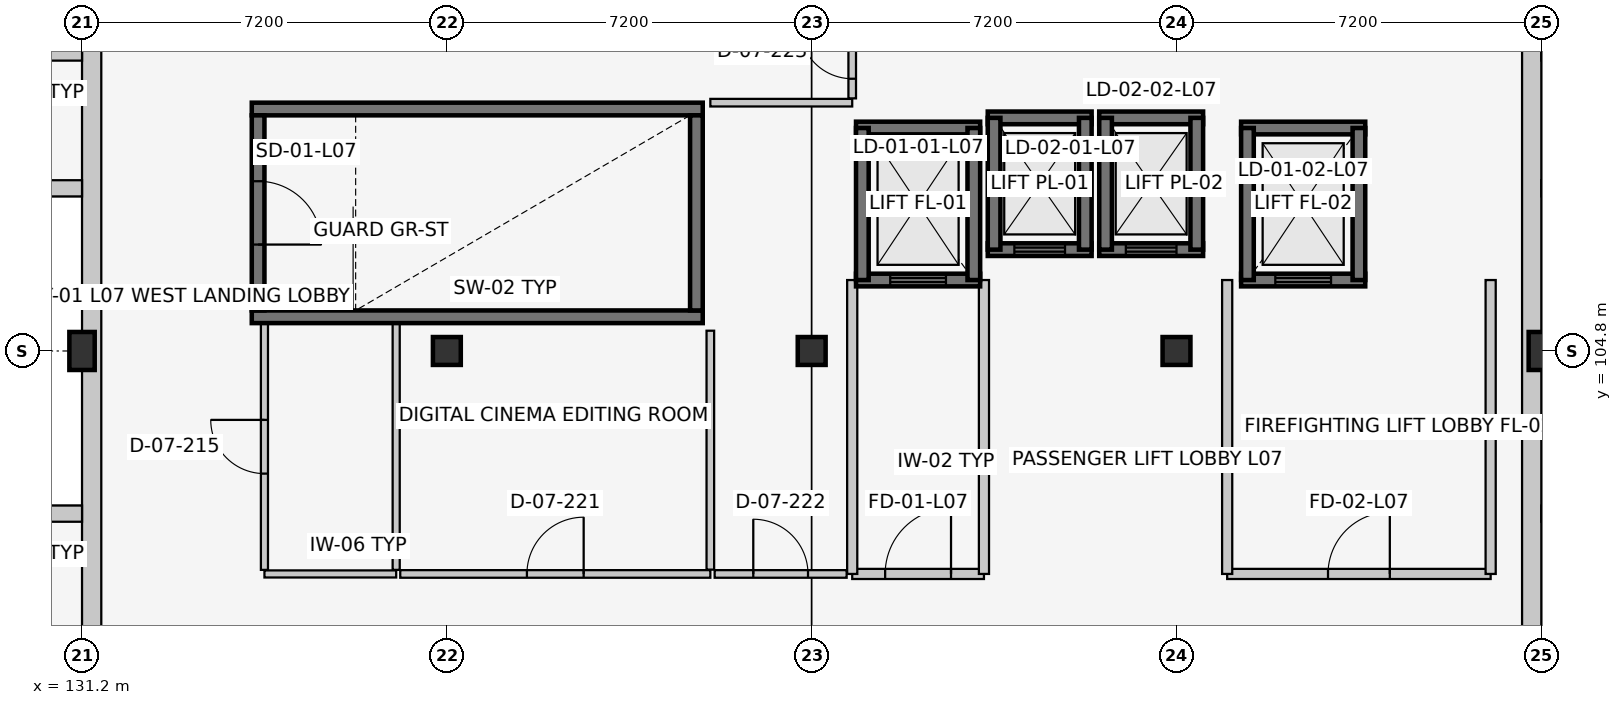
"""IFC4 building model, lengths in metres.
Left out: names, types, materials, properties, quantities, classifications, styles, units other than length and angle.
Written with IfcOpenShell. Run it as: python <this file> out.ifc"""

import sys

from ifc_helpers import new_model, si_unit, direction, frame, frame_2d, origin, origin_2d, place, context, subcontext, project, spatial, rectangle, extrude, element, fill, save


model = new_model("IFC4")
c1 = context("Model", 3, precision=1e-05, world=origin(), true_north=direction((0.0, 1.0)))
c2 = subcontext(c1, "Body", "Model", "MODEL_VIEW")
j1 = project(units=[si_unit("LENGTHUNIT", "METRE"), si_unit("PLANEANGLEUNIT", "RADIAN")], contexts=[c1])
p1 = place(None, origin())
s1 = spatial("IfcSite", under=j1, at=p1, CompositionType="ELEMENT")
p2 = place(p1, origin())
s2 = spatial("IfcBuilding", under=s1, at=p2, CompositionType="ELEMENT")
p3 = place(p2, frame((0.0, 0.0, 29.7)))
s3 = spatial("IfcBuildingStorey", under=s2, at=p3, CompositionType="ELEMENT", Elevation=29.7)
p4 = place(p3, frame((131.2, 104.8, 0.0), z_axis=(0.0, 0.0, 1.0), x_axis=(1.0, 0.0, 0.0)))
e1 = element("IfcColumn", 1, at=p4, inside=s3, PredefinedType="COLUMN", context=c2, shape_type="SweptSolid", body=[
    extrude(rectangle(XDim=0.5, YDim=0.75, at=origin_2d()), origin(), (0.0, 0.0, 1.0), 4.2),
])
for number, where, z_axis, x_axis in (
    (2, (138.4, 104.8, 0.0), (0.0, 0.0, 1.0), (1.0, 0.0, 0.0)),
    (3, (145.6, 104.8, 0.0), (0.0, 0.0, 1.0), (1.0, 0.0, 0.0)),
    (4, (152.8, 104.8, 0.0), (0.0, 0.0, 1.0), (1.0, 0.0, 0.0)),
):
    element("IfcColumn", number, at=place(p3, frame(where, z_axis=z_axis, x_axis=x_axis)), inside=s3, PredefinedType="COLUMN", context=c2, shape_type="SweptSolid", body=[
        extrude(rectangle(XDim=0.55, YDim=0.55, at=origin_2d()), origin(), (0.0, 0.0, 1.0), 4.2),
    ])
p5 = place(p3, frame((160.0, 104.8, 0.0), z_axis=(0.0, 0.0, 1.0), x_axis=(1.0, 0.0, 0.0)))
e5 = element("IfcColumn", 5, at=p5, inside=s3, PredefinedType="COLUMN", context=c2, shape_type="SweptSolid", body=[
    extrude(rectangle(XDim=0.5, YDim=0.75, at=origin_2d()), origin(), (0.0, 0.0, 1.0), 4.2),
])
p6 = place(p3, frame((159.81, 112.0, 0.0), z_axis=(0.0, 0.0, 1.0), x_axis=(0.0, -1.0, 0.0)))
e6 = element("IfcWall", 6, at=p6, inside=s3, PredefinedType="SOLIDWALL", context=c2, shape_type="SweptSolid", body=[
    extrude(rectangle(XDim=28.8, YDim=0.38, at=frame_2d((14.4, 0.0))), origin(), (0.0, 0.0, 1.0), 3.455),
])
p7 = place(p3, frame((131.39, 83.2, 0.0), z_axis=(0.0, 0.0, 1.0), x_axis=(0.0, 1.0, 0.0)))
e7 = element("IfcWall", 7, at=p7, inside=s3, PredefinedType="SOLIDWALL", context=c2, shape_type="SweptSolid", body=[
    extrude(rectangle(XDim=28.8, YDim=0.38, at=frame_2d((14.4, 0.0))), origin(), (0.0, 0.0, 1.0), 3.455),
])
p8 = place(p7, frame((10.2, 0.0, 0.0)))
e8 = element("IfcOpeningElement", 8, at=p8, cuts=e7, PredefinedType="OPENING", context=c2, shape_type="SweptSolid", body=[
    extrude(rectangle(XDim=1.2, YDim=2.15, at=frame_2d((0.6, 1.075))), frame((0.0, 0.202, 0.0), z_axis=(0.0, -1.0, 0.0), x_axis=(1.0, 0.0, 0.0)), (0.0, 0.0, 1.0), 0.404),
])
for number, where, z_axis, x_axis in (
    (9, (131.2, 101.59, 0.0), (0.0, 0.0, 1.0), (-1.0, 0.0, 0.0)),
    (10, (131.2, 108.01, 0.0), (0.0, 0.0, 1.0), (-1.0, 0.0, 0.0)),
):
    element("IfcWall", number, at=place(p3, frame(where, z_axis=z_axis, x_axis=x_axis)), inside=s3, PredefinedType="SOLIDWALL", context=c2, shape_type="SweptSolid", body=[
        extrude(rectangle(XDim=1.35, YDim=0.32, at=frame_2d((0.675, 0.0))), origin(), (0.0, 0.0, 1.0), 4.18),
    ])
p9 = place(p3, frame((131.2, 110.69, 0.0), z_axis=(0.0, 0.0, 1.0), x_axis=(-1.0, 0.0, 0.0)))
e11 = element("IfcWall", 11, at=p9, inside=s3, PredefinedType="SOLIDWALL", context=c2, shape_type="SweptSolid", body=[
    extrude(rectangle(XDim=1.793, YDim=0.32, at=frame_2d((0.896, 0.0))), origin(), (0.0, 0.0, 1.0), 4.18),
])
for number, where, z_axis, x_axis in (
    (12, (134.55, 105.475, 0.0), (0.0, 0.0, 1.0), (1.0, 0.0, 0.0)),
    (13, (143.45, 109.575, 0.0), (0.0, 0.0, 1.0), (-1.0, 0.0, 0.0)),
):
    element("IfcWall", number, at=place(p3, frame(where, z_axis=z_axis, x_axis=x_axis)), inside=s3, PredefinedType="SHEAR", context=c2, shape_type="SweptSolid", body=[
        extrude(rectangle(XDim=8.9, YDim=0.25, at=frame_2d((4.45, 0.0))), origin(), (0.0, 0.0, 1.0), 4.2),
    ])
p10 = place(p3, frame((134.675, 109.45, 0.0), z_axis=(0.0, 0.0, 1.0), x_axis=(0.0, -1.0, 0.0)))
e14 = element("IfcWall", 14, at=p10, inside=s3, PredefinedType="SHEAR", context=c2, shape_type="SweptSolid", body=[
    extrude(rectangle(XDim=3.85, YDim=0.25, at=frame_2d((1.925, 0.0))), origin(), (0.0, 0.0, 1.0), 4.2),
])
p11 = place(p10, frame((1.3, 0.0, 0.0)))
e15 = element("IfcOpeningElement", 15, at=p11, cuts=e14, PredefinedType="OPENING", context=c2, shape_type="SweptSolid", body=[
    extrude(rectangle(XDim=1.25, YDim=2.15, at=frame_2d((0.625, 1.075))), frame((0.0, 0.137, 0.0), z_axis=(0.0, -1.0, 0.0), x_axis=(1.0, 0.0, 0.0)), (0.0, 0.0, 1.0), 0.274),
])
p12 = place(p3, frame((143.325, 105.6, 0.0), z_axis=(0.0, 0.0, 1.0), x_axis=(0.0, 1.0, 0.0)))
e16 = element("IfcWall", 16, at=p12, inside=s3, PredefinedType="SHEAR", context=c2, shape_type="SweptSolid", body=[
    extrude(rectangle(XDim=3.85, YDim=0.25, at=frame_2d((1.925, 0.0))), origin(), (0.0, 0.0, 1.0), 4.2),
])
p13 = place(p3, frame((146.475, 106.2, 0.0), z_axis=(0.0, 0.0, 1.0), x_axis=(1.0, 0.0, 0.0)))
e17 = element("IfcWall", 17, at=p13, inside=s3, PredefinedType="SHEAR", context=c2, shape_type="SweptSolid", body=[
    extrude(rectangle(XDim=2.45, YDim=0.25, at=frame_2d((1.225, 0.0))), origin(), (0.0, 0.0, 1.0), 4.2),
])
p14 = place(p13, frame((0.675, 0.0, 0.0)))
e18 = element("IfcOpeningElement", 18, at=p14, cuts=e17, PredefinedType="OPENING", context=c2, shape_type="SweptSolid", body=[
    extrude(rectangle(XDim=1.1, YDim=2.15, at=frame_2d((0.55, 1.075))), frame((0.0, 0.137, 0.0), z_axis=(0.0, -1.0, 0.0), x_axis=(1.0, 0.0, 0.0)), (0.0, 0.0, 1.0), 0.274),
])
p15 = place(p3, frame((148.925, 109.2, 0.0), z_axis=(0.0, 0.0, 1.0), x_axis=(-1.0, 0.0, 0.0)))
e19 = element("IfcWall", 19, at=p15, inside=s3, PredefinedType="SHEAR", context=c2, shape_type="SweptSolid", body=[
    extrude(rectangle(XDim=2.45, YDim=0.25, at=frame_2d((1.225, 0.0))), origin(), (0.0, 0.0, 1.0), 4.2),
])
for number, where, z_axis, x_axis in (
    (20, (146.6, 109.2, 0.0), (0.0, 0.0, 1.0), (0.0, -1.0, 0.0)),
    (21, (148.8, 106.2, 0.0), (0.0, 0.0, 1.0), (0.0, 1.0, 0.0)),
):
    element("IfcWall", number, at=place(p3, frame(where, z_axis=z_axis, x_axis=x_axis)), inside=s3, PredefinedType="SHEAR", context=c2, shape_type="SweptSolid", body=[
        extrude(rectangle(XDim=3.0, YDim=0.25, at=frame_2d((1.5, 0.0))), origin(), (0.0, 0.0, 1.0), 4.2),
    ])
p16 = place(p3, frame((146.4, 100.4, 0.0), z_axis=(0.0, 0.0, 1.0), x_axis=(1.0, 0.0, 0.0)))
e22 = element("IfcWall", 22, at=p16, inside=s3, PredefinedType="PARTITIONING", context=c2, shape_type="SweptSolid", body=[
    extrude(rectangle(XDim=2.6, YDim=0.2, at=frame_2d((1.3, 0.0))), origin(), (0.0, 0.0, 1.0), 4.2),
])
p17 = place(p16, frame((0.65, 0.0, 0.0)))
e23 = element("IfcOpeningElement", 23, at=p17, cuts=e22, PredefinedType="OPENING", context=c2, shape_type="SweptSolid", body=[
    extrude(rectangle(XDim=1.3, YDim=2.2, at=frame_2d((0.65, 1.1))), frame((0.0, 0.112, 0.0), z_axis=(0.0, -1.0, 0.0), x_axis=(1.0, 0.0, 0.0)), (0.0, 0.0, 1.0), 0.224),
])
for number, where, z_axis, x_axis in (
    (24, (146.4, 106.2, 0.0), (0.0, 0.0, 1.0), (0.0, -1.0, 0.0)),
    (25, (149.0, 100.4, 0.0), (0.0, 0.0, 1.0), (0.0, 1.0, 0.0)),
):
    element("IfcWall", number, at=place(p3, frame(where, z_axis=z_axis, x_axis=x_axis)), inside=s3, PredefinedType="PARTITIONING", context=c2, shape_type="SweptSolid", body=[
        extrude(rectangle(XDim=5.8, YDim=0.2, at=frame_2d((2.9, 0.0))), origin(), (0.0, 0.0, 1.0), 4.2),
    ])
p18 = place(p3, frame((154.075, 106.2, 0.0), z_axis=(0.0, 0.0, 1.0), x_axis=(1.0, 0.0, 0.0)))
e26 = element("IfcWall", 26, at=p18, inside=s3, PredefinedType="SHEAR", context=c2, shape_type="SweptSolid", body=[
    extrude(rectangle(XDim=2.45, YDim=0.25, at=frame_2d((1.225, 0.0))), origin(), (0.0, 0.0, 1.0), 4.2),
])
p19 = place(p18, frame((0.675, 0.0, 0.0)))
e27 = element("IfcOpeningElement", 27, at=p19, cuts=e26, PredefinedType="OPENING", context=c2, shape_type="SweptSolid", body=[
    extrude(rectangle(XDim=1.1, YDim=2.15, at=frame_2d((0.55, 1.075))), frame((0.0, 0.137, 0.0), z_axis=(0.0, -1.0, 0.0), x_axis=(1.0, 0.0, 0.0)), (0.0, 0.0, 1.0), 0.274),
])
p20 = place(p3, frame((156.525, 109.2, 0.0), z_axis=(0.0, 0.0, 1.0), x_axis=(-1.0, 0.0, 0.0)))
e28 = element("IfcWall", 28, at=p20, inside=s3, PredefinedType="SHEAR", context=c2, shape_type="SweptSolid", body=[
    extrude(rectangle(XDim=2.45, YDim=0.25, at=frame_2d((1.225, 0.0))), origin(), (0.0, 0.0, 1.0), 4.2),
])
for number, where, z_axis, x_axis in (
    (29, (154.2, 109.2, 0.0), (0.0, 0.0, 1.0), (0.0, -1.0, 0.0)),
    (30, (156.4, 106.2, 0.0), (0.0, 0.0, 1.0), (0.0, 1.0, 0.0)),
):
    element("IfcWall", number, at=place(p3, frame(where, z_axis=z_axis, x_axis=x_axis)), inside=s3, PredefinedType="SHEAR", context=c2, shape_type="SweptSolid", body=[
        extrude(rectangle(XDim=3.0, YDim=0.25, at=frame_2d((1.5, 0.0))), origin(), (0.0, 0.0, 1.0), 4.2),
    ])
p21 = place(p3, frame((153.8, 100.4, 0.0), z_axis=(0.0, 0.0, 1.0), x_axis=(1.0, 0.0, 0.0)))
e31 = element("IfcWall", 31, at=p21, inside=s3, PredefinedType="PARTITIONING", context=c2, shape_type="SweptSolid", body=[
    extrude(rectangle(XDim=5.2, YDim=0.2, at=frame_2d((2.6, 0.0))), origin(), (0.0, 0.0, 1.0), 4.2),
])
p22 = place(p21, frame((1.99, 0.0, 0.0)))
e32 = element("IfcOpeningElement", 32, at=p22, cuts=e31, PredefinedType="OPENING", context=c2, shape_type="SweptSolid", body=[
    extrude(rectangle(XDim=1.22, YDim=2.2, at=frame_2d((0.61, 1.1))), frame((0.0, 0.112, 0.0), z_axis=(0.0, -1.0, 0.0), x_axis=(1.0, 0.0, 0.0)), (0.0, 0.0, 1.0), 0.224),
])
for number, where, z_axis, x_axis in (
    (33, (153.8, 106.2, 0.0), (0.0, 0.0, 1.0), (0.0, -1.0, 0.0)),
    (34, (159.0, 100.4, 0.0), (0.0, 0.0, 1.0), (0.0, 1.0, 0.0)),
):
    element("IfcWall", number, at=place(p3, frame(where, z_axis=z_axis, x_axis=x_axis)), inside=s3, PredefinedType="PARTITIONING", context=c2, shape_type="SweptSolid", body=[
        extrude(rectangle(XDim=5.8, YDim=0.2, at=frame_2d((2.9, 0.0))), origin(), (0.0, 0.0, 1.0), 4.2),
    ])
p23 = place(p3, frame((149.075, 106.8, 0.0), z_axis=(0.0, 0.0, 1.0), x_axis=(1.0, 0.0, 0.0)))
e35 = element("IfcWall", 35, at=p23, inside=s3, PredefinedType="SHEAR", context=c2, shape_type="SweptSolid", body=[
    extrude(rectangle(XDim=2.05, YDim=0.25, at=frame_2d((1.025, 0.0))), origin(), (0.0, 0.0, 1.0), 4.2),
])
p24 = place(p23, frame((0.525, 0.0, 0.0)))
e36 = element("IfcOpeningElement", 36, at=p24, cuts=e35, PredefinedType="OPENING", context=c2, shape_type="SweptSolid", body=[
    extrude(rectangle(XDim=1.0, YDim=2.15, at=frame_2d((0.5, 1.075))), frame((0.0, 0.137, 0.0), z_axis=(0.0, -1.0, 0.0), x_axis=(1.0, 0.0, 0.0)), (0.0, 0.0, 1.0), 0.274),
])
p25 = place(p3, frame((151.125, 109.4, 0.0), z_axis=(0.0, 0.0, 1.0), x_axis=(-1.0, 0.0, 0.0)))
e37 = element("IfcWall", 37, at=p25, inside=s3, PredefinedType="SHEAR", context=c2, shape_type="SweptSolid", body=[
    extrude(rectangle(XDim=2.05, YDim=0.25, at=frame_2d((1.025, 0.0))), origin(), (0.0, 0.0, 1.0), 4.2),
])
for number, where, z_axis, x_axis in (
    (38, (149.2, 109.4, 0.0), (0.0, 0.0, 1.0), (0.0, -1.0, 0.0)),
    (39, (151.0, 106.8, 0.0), (0.0, 0.0, 1.0), (0.0, 1.0, 0.0)),
):
    element("IfcWall", number, at=place(p3, frame(where, z_axis=z_axis, x_axis=x_axis)), inside=s3, PredefinedType="SHEAR", context=c2, shape_type="SweptSolid", body=[
        extrude(rectangle(XDim=2.6, YDim=0.25, at=frame_2d((1.3, 0.0))), origin(), (0.0, 0.0, 1.0), 4.2),
    ])
p26 = place(p3, frame((151.275, 106.8, 0.0), z_axis=(0.0, 0.0, 1.0), x_axis=(1.0, 0.0, 0.0)))
e40 = element("IfcWall", 40, at=p26, inside=s3, PredefinedType="SHEAR", context=c2, shape_type="SweptSolid", body=[
    extrude(rectangle(XDim=2.05, YDim=0.25, at=frame_2d((1.025, 0.0))), origin(), (0.0, 0.0, 1.0), 4.2),
])
p27 = place(p26, frame((0.525, 0.0, 0.0)))
e41 = element("IfcOpeningElement", 41, at=p27, cuts=e40, PredefinedType="OPENING", context=c2, shape_type="SweptSolid", body=[
    extrude(rectangle(XDim=1.0, YDim=2.15, at=frame_2d((0.5, 1.075))), frame((0.0, 0.137, 0.0), z_axis=(0.0, -1.0, 0.0), x_axis=(1.0, 0.0, 0.0)), (0.0, 0.0, 1.0), 0.274),
])
p28 = place(p3, frame((153.325, 109.4, 0.0), z_axis=(0.0, 0.0, 1.0), x_axis=(-1.0, 0.0, 0.0)))
e42 = element("IfcWall", 42, at=p28, inside=s3, PredefinedType="SHEAR", context=c2, shape_type="SweptSolid", body=[
    extrude(rectangle(XDim=2.05, YDim=0.25, at=frame_2d((1.025, 0.0))), origin(), (0.0, 0.0, 1.0), 4.2),
])
for number, where, z_axis, x_axis in (
    (43, (151.4, 109.4, 0.0), (0.0, 0.0, 1.0), (0.0, -1.0, 0.0)),
    (44, (153.2, 106.8, 0.0), (0.0, 0.0, 1.0), (0.0, 1.0, 0.0)),
):
    element("IfcWall", number, at=place(p3, frame(where, z_axis=z_axis, x_axis=x_axis)), inside=s3, PredefinedType="SHEAR", context=c2, shape_type="SweptSolid", body=[
        extrude(rectangle(XDim=2.6, YDim=0.25, at=frame_2d((1.3, 0.0))), origin(), (0.0, 0.0, 1.0), 4.2),
    ])
p29 = place(p3, frame((134.8, 100.4, 0.0), z_axis=(0.0, 0.0, 1.0), x_axis=(1.0, 0.0, 0.0)))
e45 = element("IfcWall", 45, at=p29, inside=s3, PredefinedType="PARTITIONING", context=c2, shape_type="SweptSolid", body=[
    extrude(rectangle(XDim=2.6, YDim=0.14, at=frame_2d((1.3, 0.0))), origin(), (0.0, 0.0, 1.0), 4.2),
])
p30 = place(p3, frame((134.8, 100.48, 0.0), z_axis=(0.0, 0.0, 1.0), x_axis=(0.0, 1.0, 0.0)))
e46 = element("IfcWall", 46, at=p30, inside=s3, PredefinedType="PARTITIONING", context=c2, shape_type="SweptSolid", body=[
    extrude(rectangle(XDim=4.86, YDim=0.14, at=frame_2d((2.43, 0.0))), origin(), (0.0, 0.0, 1.0), 4.2),
])
p31 = place(p30, frame((1.9, 0.0, 0.0)))
e47 = element("IfcOpeningElement", 47, at=p31, cuts=e46, PredefinedType="OPENING", context=c2, shape_type="SweptSolid", body=[
    extrude(rectangle(XDim=1.06, YDim=2.1, at=frame_2d((0.53, 1.05))), frame((0.0, 0.082, 0.0), z_axis=(0.0, -1.0, 0.0), x_axis=(1.0, 0.0, 0.0)), (0.0, 0.0, 1.0), 0.164),
])
p32 = place(p3, frame((137.4, 100.48, 0.0), z_axis=(0.0, 0.0, 1.0), x_axis=(0.0, 1.0, 0.0)))
e48 = element("IfcWall", 48, at=p32, inside=s3, PredefinedType="PARTITIONING", context=c2, shape_type="SweptSolid", body=[
    extrude(rectangle(XDim=4.86, YDim=0.14, at=frame_2d((2.43, 0.0))), origin(), (0.0, 0.0, 1.0), 4.2),
])
p33 = place(p3, frame((137.48, 100.4, 0.0), z_axis=(0.0, 0.0, 1.0), x_axis=(1.0, 0.0, 0.0)))
e49 = element("IfcWall", 49, at=p33, inside=s3, PredefinedType="PARTITIONING", context=c2, shape_type="SweptSolid", body=[
    extrude(rectangle(XDim=6.12, YDim=0.15, at=frame_2d((3.06, 0.0))), origin(), (0.0, 0.0, 1.0), 4.2),
])
p34 = place(p33, frame((2.5, 0.0, 0.0)))
e50 = element("IfcOpeningElement", 50, at=p34, cuts=e49, PredefinedType="OPENING", context=c2, shape_type="SweptSolid", body=[
    extrude(rectangle(XDim=1.12, YDim=2.15, at=frame_2d((0.56, 1.075))), frame((0.0, 0.087, 0.0), z_axis=(0.0, -1.0, 0.0), x_axis=(1.0, 0.0, 0.0)), (0.0, 0.0, 1.0), 0.174),
])
p35 = place(p3, frame((143.6, 100.485, 0.0), z_axis=(0.0, 0.0, 1.0), x_axis=(0.0, 1.0, 0.0)))
e51 = element("IfcWall", 51, at=p35, inside=s3, PredefinedType="PARTITIONING", context=c2, shape_type="SweptSolid", body=[
    extrude(rectangle(XDim=4.715, YDim=0.15, at=frame_2d((2.357, 0.0))), origin(), (0.0, 0.0, 1.0), 4.2),
])
p36 = place(p3, frame((143.685, 100.4, 0.0), z_axis=(0.0, 0.0, 1.0), x_axis=(1.0, 0.0, 0.0)))
e52 = element("IfcWall", 52, at=p36, inside=s3, PredefinedType="PARTITIONING", context=c2, shape_type="SweptSolid", body=[
    extrude(rectangle(XDim=2.605, YDim=0.15, at=frame_2d((1.302, 0.0))), origin(), (0.0, 0.0, 1.0), 4.2),
])
p37 = place(p36, frame((0.762, 0.0, 0.0)))
e53 = element("IfcOpeningElement", 53, at=p37, cuts=e52, PredefinedType="OPENING", context=c2, shape_type="SweptSolid", body=[
    extrude(rectangle(XDim=1.08, YDim=2.15, at=frame_2d((0.54, 1.075))), frame((0.0, 0.087, 0.0), z_axis=(0.0, -1.0, 0.0), x_axis=(1.0, 0.0, 0.0)), (0.0, 0.0, 1.0), 0.174),
])
p38 = place(p3, frame((143.6, 109.7, 0.0), z_axis=(0.0, 0.0, 1.0), x_axis=(1.0, 0.0, 0.0)))
e54 = element("IfcWall", 54, at=p38, inside=s3, PredefinedType="PARTITIONING", context=c2, shape_type="SweptSolid", body=[
    extrude(rectangle(XDim=2.8, YDim=0.15, at=frame_2d((1.4, 0.0))), origin(), (0.0, 0.0, 1.0), 4.2),
])
p39 = place(p3, frame((146.4, 109.785, 0.0), z_axis=(0.0, 0.0, 1.0), x_axis=(0.0, 1.0, 0.0)))
e55 = element("IfcWall", 55, at=p39, inside=s3, PredefinedType="PARTITIONING", context=c2, shape_type="SweptSolid", body=[
    extrude(rectangle(XDim=1.815, YDim=0.15, at=frame_2d((0.908, 0.0))), origin(), (0.0, 0.0, 1.0), 4.2),
])
p40 = place(p39, frame((0.387, 0.0, 0.0)))
e56 = element("IfcOpeningElement", 56, at=p40, cuts=e55, PredefinedType="OPENING", context=c2, shape_type="SweptSolid", body=[
    extrude(rectangle(XDim=1.04, YDim=2.15, at=frame_2d((0.52, 1.075))), frame((0.0, 0.087, 0.0), z_axis=(0.0, -1.0, 0.0), x_axis=(1.0, 0.0, 0.0)), (0.0, 0.0, 1.0), 0.174),
])
p41 = place(p11, origin())
e57 = element("IfcDoor", 57, at=p41, inside=s3, OperationType="SINGLE_SWING_RIGHT", PredefinedType="DOOR", context=c2, shape_type="SweptSolid", body=[
    extrude(rectangle(XDim=1.25, YDim=2.15, at=frame_2d((0.625, 1.075))), frame((0.0, 0.025, 0.0), z_axis=(0.0, -1.0, 0.0), x_axis=(1.0, 0.0, 0.0)), (0.0, 0.0, 1.0), 0.05),
])
fill(e15, e57)
p42 = place(p14, origin())
e58 = element("IfcDoor", 58, at=p42, inside=s3, OperationType="SLIDING_TO_LEFT", PredefinedType="DOOR", context=c2, shape_type="SweptSolid", body=[
    extrude(rectangle(XDim=1.1, YDim=2.15, at=frame_2d((0.55, 1.075))), frame((0.0, 0.025, 0.0), z_axis=(0.0, -1.0, 0.0), x_axis=(1.0, 0.0, 0.0)), (0.0, 0.0, 1.0), 0.05),
])
fill(e18, e58)
p43 = place(p17, origin())
e59 = element("IfcDoor", 59, at=p43, inside=s3, OperationType="SINGLE_SWING_RIGHT", PredefinedType="DOOR", context=c2, shape_type="SweptSolid", body=[
    extrude(rectangle(XDim=1.3, YDim=2.2, at=frame_2d((0.65, 1.1))), frame((0.0, 0.025, 0.0), z_axis=(0.0, -1.0, 0.0), x_axis=(1.0, 0.0, 0.0)), (0.0, 0.0, 1.0), 0.05),
])
fill(e23, e59)
p44 = place(p19, origin())
e60 = element("IfcDoor", 60, at=p44, inside=s3, OperationType="SLIDING_TO_LEFT", PredefinedType="DOOR", context=c2, shape_type="SweptSolid", body=[
    extrude(rectangle(XDim=1.1, YDim=2.15, at=frame_2d((0.55, 1.075))), frame((0.0, 0.025, 0.0), z_axis=(0.0, -1.0, 0.0), x_axis=(1.0, 0.0, 0.0)), (0.0, 0.0, 1.0), 0.05),
])
fill(e27, e60)
p45 = place(p22, origin())
e61 = element("IfcDoor", 61, at=p45, inside=s3, OperationType="SINGLE_SWING_RIGHT", PredefinedType="DOOR", context=c2, shape_type="SweptSolid", body=[
    extrude(rectangle(XDim=1.22, YDim=2.2, at=frame_2d((0.61, 1.1))), frame((0.0, 0.025, 0.0), z_axis=(0.0, -1.0, 0.0), x_axis=(1.0, 0.0, 0.0)), (0.0, 0.0, 1.0), 0.05),
])
fill(e32, e61)
p46 = place(p24, origin())
e62 = element("IfcDoor", 62, at=p46, inside=s3, OperationType="SLIDING_TO_LEFT", PredefinedType="DOOR", context=c2, shape_type="SweptSolid", body=[
    extrude(rectangle(XDim=1.0, YDim=2.15, at=frame_2d((0.5, 1.075))), frame((0.0, 0.025, 0.0), z_axis=(0.0, -1.0, 0.0), x_axis=(1.0, 0.0, 0.0)), (0.0, 0.0, 1.0), 0.05),
])
fill(e36, e62)
p47 = place(p27, origin())
e63 = element("IfcDoor", 63, at=p47, inside=s3, OperationType="SLIDING_TO_LEFT", PredefinedType="DOOR", context=c2, shape_type="SweptSolid", body=[
    extrude(rectangle(XDim=1.0, YDim=2.15, at=frame_2d((0.5, 1.075))), frame((0.0, 0.025, 0.0), z_axis=(0.0, -1.0, 0.0), x_axis=(1.0, 0.0, 0.0)), (0.0, 0.0, 1.0), 0.05),
])
fill(e41, e63)
p48 = place(p31, origin())
e64 = element("IfcDoor", 64, at=p48, inside=s3, OperationType="SINGLE_SWING_RIGHT", PredefinedType="DOOR", context=c2, shape_type="SweptSolid", body=[
    extrude(rectangle(XDim=1.06, YDim=2.1, at=frame_2d((0.53, 1.05))), frame((0.0, 0.025, 0.0), z_axis=(0.0, -1.0, 0.0), x_axis=(1.0, 0.0, 0.0)), (0.0, 0.0, 1.0), 0.05),
])
fill(e47, e64)
p49 = place(p34, origin())
e65 = element("IfcDoor", 65, at=p49, inside=s3, OperationType="SINGLE_SWING_RIGHT", PredefinedType="DOOR", context=c2, shape_type="SweptSolid", body=[
    extrude(rectangle(XDim=1.12, YDim=2.15, at=frame_2d((0.56, 1.075))), frame((0.0, 0.025, 0.0), z_axis=(0.0, -1.0, 0.0), x_axis=(1.0, 0.0, 0.0)), (0.0, 0.0, 1.0), 0.05),
])
fill(e50, e65)
p50 = place(p37, origin())
e66 = element("IfcDoor", 66, at=p50, inside=s3, OperationType="SINGLE_SWING_LEFT", PredefinedType="DOOR", context=c2, shape_type="SweptSolid", body=[
    extrude(rectangle(XDim=1.08, YDim=2.15, at=frame_2d((0.54, 1.075))), frame((0.0, 0.025, 0.0), z_axis=(0.0, -1.0, 0.0), x_axis=(1.0, 0.0, 0.0)), (0.0, 0.0, 1.0), 0.05),
])
fill(e53, e66)
p51 = place(p40, origin())
e67 = element("IfcDoor", 67, at=p51, inside=s3, OperationType="SINGLE_SWING_RIGHT", PredefinedType="DOOR", context=c2, shape_type="SweptSolid", body=[
    extrude(rectangle(XDim=1.04, YDim=2.15, at=frame_2d((0.52, 1.075))), frame((0.0, 0.025, 0.0), z_axis=(0.0, -1.0, 0.0), x_axis=(1.0, 0.0, 0.0)), (0.0, 0.0, 1.0), 0.05),
])
fill(e56, e67)
save(model, sys.argv[1])
